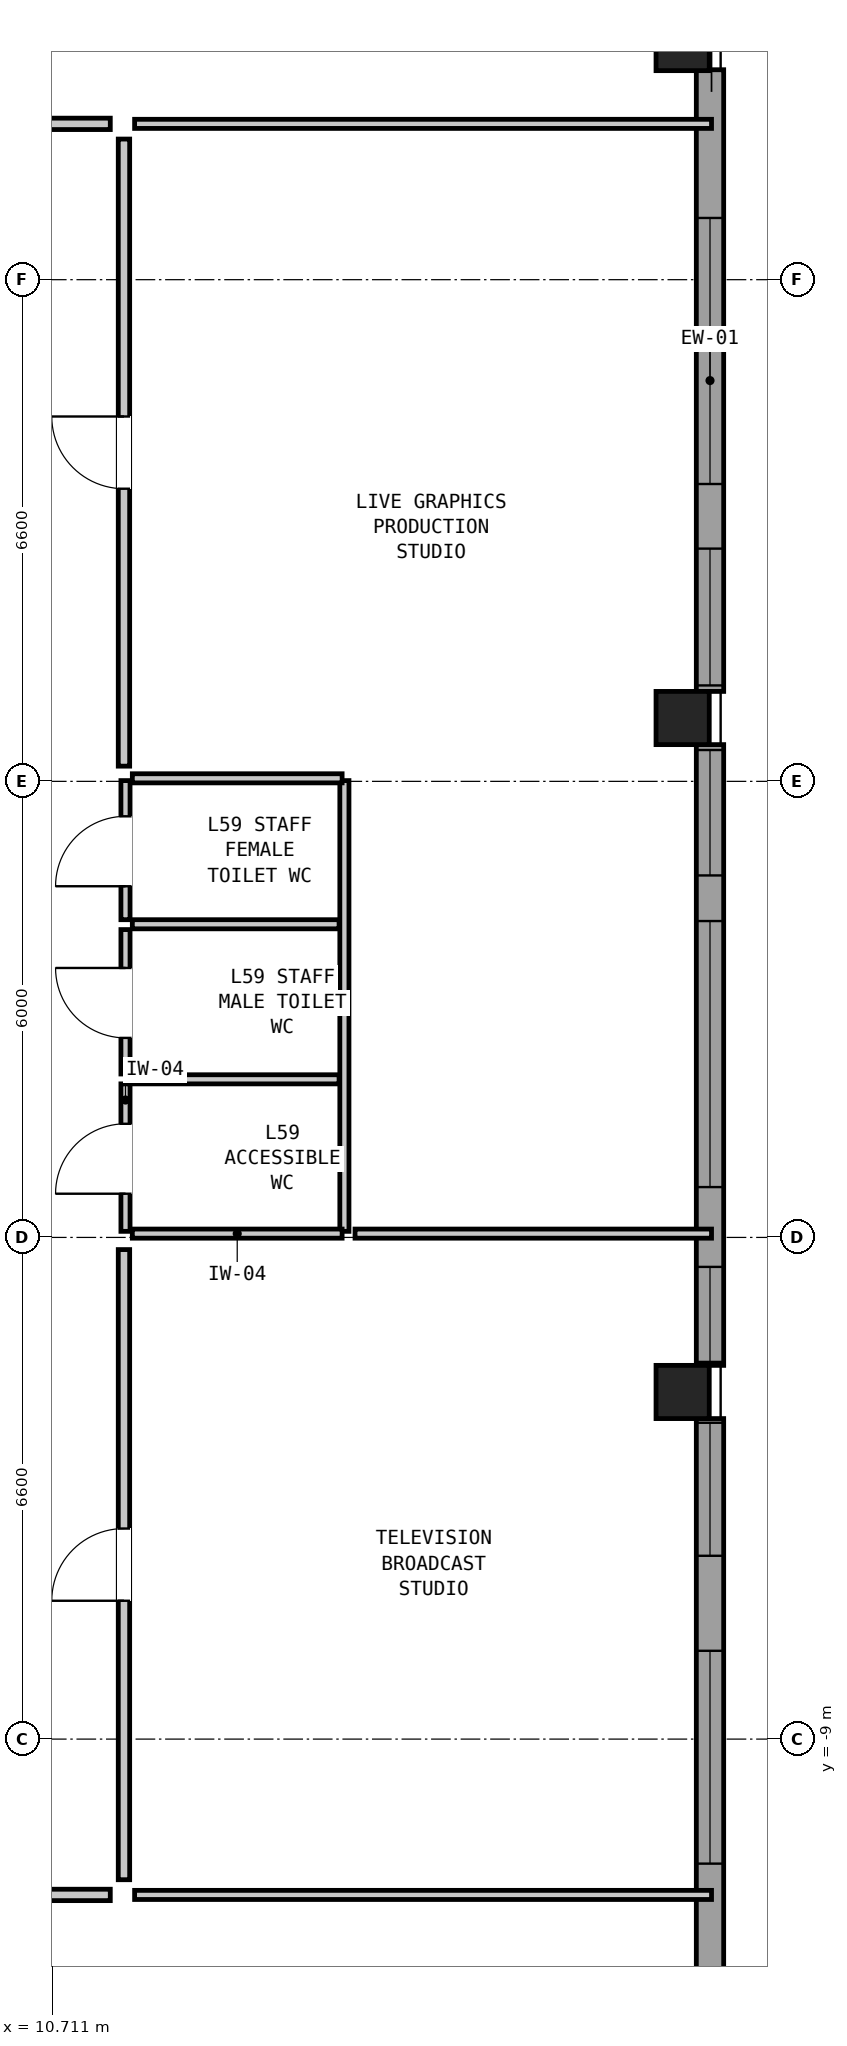
"""IFC4 building model, lengths in metres.
Left out: names, types, materials, properties, quantities, classifications, styles, units other than length and angle.
Written with IfcOpenShell. Run it as: python <this file> out.ifc"""

import sys

from ifc_helpers import new_model, si_unit, direction, frame, frame_2d, origin, origin_2d, place, context, subcontext, project, spatial, rectangle, hollow_rectangle, extrude, element, fill, save


model = new_model("IFC4")
c1 = context("Model", 3, precision=1e-05, world=origin(), true_north=direction((0.0, 1.0)))
c2 = subcontext(c1, "Body", "Model", "MODEL_VIEW")
j1 = project(units=[si_unit("LENGTHUNIT", "METRE"), si_unit("PLANEANGLEUNIT", "RADIAN")], contexts=[c1])
p1 = place(None, origin())
s1 = spatial("IfcSite", under=j1, at=p1, CompositionType="ELEMENT")
p2 = place(p1, origin())
s2 = spatial("IfcBuilding", under=s1, at=p2, CompositionType="ELEMENT")
p3 = place(p2, frame((0.0, 0.0, 202.55)))
s3 = spatial("IfcBuildingStorey", under=s2, at=p3, CompositionType="ELEMENT", Elevation=202.55)
for number, where, z_axis, x_axis in (
    (1, (19.0, -4.433, 0.0), (0.0, 0.0, 1.0), (0.0, 1.0, 0.0)),
    (2, (19.0, 4.433, 0.0), (0.0, 0.0, 1.0), (0.0, 1.0, 0.0)),
    (3, (19.0, 13.3, 0.0), (0.0, 0.0, 1.0), (0.0, 1.0, 0.0)),
):
    element("IfcColumn", number, at=place(p3, frame(where, z_axis=z_axis, x_axis=x_axis)), inside=s3, PredefinedType="COLUMN", context=c2, shape_type="SweptSolid", body=[
        extrude(hollow_rectangle(XDim=0.7, YDim=0.7, WallThickness=0.045, at=origin_2d()), origin(), (0.0, 0.0, 1.0), 3.05),
    ])
p4 = place(p3, frame((19.36, 12.962, 0.0), z_axis=(0.0, 0.0, 1.0), x_axis=(0.0, -1.0, 0.0)))
e4 = element("IfcWall", 4, at=p4, inside=s3, PredefinedType="SOLIDWALL", context=c2, shape_type="SweptSolid", body=[
    extrude(rectangle(XDim=8.179, YDim=0.36, at=frame_2d((4.089, 0.0))), origin(), (0.0, 0.0, 1.0), 2.374),
])
p5 = place(p4, frame((1.95, 0.0, 0.2)))
e5 = element("IfcOpeningElement", 5, at=p5, cuts=e4, PredefinedType="OPENING", context=c2, shape_type="SweptSolid", body=[
    extrude(rectangle(XDim=3.5, YDim=0.95, at=frame_2d((1.75, 0.475))), frame((0.0, 0.192, 0.0), z_axis=(0.0, -1.0, 0.0), x_axis=(1.0, 0.0, 0.0)), (0.0, 0.0, 1.0), 0.384),
])
p6 = place(p4, frame((6.3, 0.0, 1.15)))
e6 = element("IfcOpeningElement", 6, at=p6, cuts=e4, PredefinedType="OPENING", context=c2, shape_type="SweptSolid", body=[
    extrude(rectangle(XDim=1.8, YDim=1.05, at=frame_2d((0.9, 0.525))), frame((0.0, 0.192, 0.0), z_axis=(0.0, -1.0, 0.0), x_axis=(1.0, 0.0, 0.0)), (0.0, 0.0, 1.0), 0.384),
])
p7 = place(p3, frame((19.36, 4.083, 0.0), z_axis=(0.0, 0.0, 1.0), x_axis=(0.0, -1.0, 0.0)))
e7 = element("IfcWall", 7, at=p7, inside=s3, PredefinedType="SOLIDWALL", context=c2, shape_type="SweptSolid", body=[
    extrude(rectangle(XDim=8.167, YDim=0.36, at=frame_2d((4.083, 0.0))), origin(), (0.0, 0.0, 1.0), 2.374),
])
p8 = place(p7, frame((0.071, 0.0, 1.3)))
e8 = element("IfcOpeningElement", 8, at=p8, cuts=e7, PredefinedType="OPENING", context=c2, shape_type="SweptSolid", body=[
    extrude(rectangle(XDim=1.65, YDim=0.9, at=frame_2d((0.825, 0.45))), frame((0.0, 0.192, 0.0), z_axis=(0.0, -1.0, 0.0), x_axis=(1.0, 0.0, 0.0)), (0.0, 0.0, 1.0), 0.384),
])
p9 = place(p7, frame((2.321, 0.0, 0.2)))
e9 = element("IfcOpeningElement", 9, at=p9, cuts=e7, PredefinedType="OPENING", context=c2, shape_type="SweptSolid", body=[
    extrude(rectangle(XDim=3.5, YDim=0.95, at=frame_2d((1.75, 0.475))), frame((0.0, 0.192, 0.0), z_axis=(0.0, -1.0, 0.0), x_axis=(1.0, 0.0, 0.0)), (0.0, 0.0, 1.0), 0.384),
])
p10 = place(p7, frame((6.871, 0.0, 1.05)))
e10 = element("IfcOpeningElement", 10, at=p10, cuts=e7, PredefinedType="OPENING", context=c2, shape_type="SweptSolid", body=[
    extrude(rectangle(XDim=1.25, YDim=1.15, at=frame_2d((0.625, 0.575))), frame((0.0, 0.192, 0.0), z_axis=(0.0, -1.0, 0.0), x_axis=(1.0, 0.0, 0.0)), (0.0, 0.0, 1.0), 0.384),
])
p11 = place(p3, frame((19.36, -4.783, 0.0), z_axis=(0.0, 0.0, 1.0), x_axis=(0.0, -1.0, 0.0)))
e11 = element("IfcWall", 11, at=p11, inside=s3, PredefinedType="SOLIDWALL", context=c2, shape_type="SweptSolid", body=[
    extrude(rectangle(XDim=8.179, YDim=0.36, at=frame_2d((4.089, 0.0))), origin(), (0.0, 0.0, 1.0), 2.374),
])
p12 = place(p11, frame((0.055, 0.0, 1.1)))
e12 = element("IfcOpeningElement", 12, at=p12, cuts=e11, PredefinedType="OPENING", context=c2, shape_type="SweptSolid", body=[
    extrude(rectangle(XDim=1.75, YDim=1.1, at=frame_2d((0.875, 0.55))), frame((0.0, 0.192, 0.0), z_axis=(0.0, -1.0, 0.0), x_axis=(1.0, 0.0, 0.0)), (0.0, 0.0, 1.0), 0.384),
])
p13 = place(p11, frame((3.055, 0.0, 0.2)))
e13 = element("IfcOpeningElement", 13, at=p13, cuts=e11, PredefinedType="OPENING", context=c2, shape_type="SweptSolid", body=[
    extrude(rectangle(XDim=2.8, YDim=1.15, at=frame_2d((1.4, 0.575))), frame((0.0, 0.192, 0.0), z_axis=(0.0, -1.0, 0.0), x_axis=(1.0, 0.0, 0.0)), (0.0, 0.0, 1.0), 0.384),
])
p14 = place(p3, frame((11.67, -2.32, 0.0), z_axis=(0.0, 0.0, 1.0), x_axis=(0.0, 1.0, 0.0)))
e14 = element("IfcWall", 14, at=p14, inside=s3, PredefinedType="PARTITIONING", context=c2, shape_type="SweptSolid", body=[
    extrude(rectangle(XDim=1.94, YDim=0.12, at=frame_2d((0.97, 0.0))), origin(), (0.0, 0.0, 1.0), 2.86),
])
p15 = place(p14, frame((0.495, 0.0, 0.0)))
e15 = element("IfcOpeningElement", 15, at=p15, cuts=e14, PredefinedType="OPENING", context=c2, shape_type="SweptSolid", body=[
    extrude(rectangle(XDim=0.92, YDim=2.1, at=frame_2d((0.46, 1.05))), frame((0.0, 0.072, 0.0), z_axis=(0.0, -1.0, 0.0), x_axis=(1.0, 0.0, 0.0)), (0.0, 0.0, 1.0), 0.144),
])
p16 = place(p3, frame((11.67, -0.25, 0.0), z_axis=(0.0, 0.0, 1.0), x_axis=(0.0, 1.0, 0.0)))
e16 = element("IfcWall", 16, at=p16, inside=s3, PredefinedType="PARTITIONING", context=c2, shape_type="SweptSolid", body=[
    extrude(rectangle(XDim=1.9, YDim=0.12, at=frame_2d((0.95, 0.0))), origin(), (0.0, 0.0, 1.0), 2.86),
])
p17 = place(p16, frame((0.475, 0.0, 0.0)))
e17 = element("IfcOpeningElement", 17, at=p17, cuts=e16, PredefinedType="OPENING", context=c2, shape_type="SweptSolid", body=[
    extrude(rectangle(XDim=0.92, YDim=2.1, at=frame_2d((0.46, 1.05))), frame((0.0, 0.072, 0.0), z_axis=(0.0, -1.0, 0.0), x_axis=(1.0, 0.0, 0.0)), (0.0, 0.0, 1.0), 0.144),
])
p18 = place(p3, frame((11.67, 1.78, 0.0), z_axis=(0.0, 0.0, 1.0), x_axis=(0.0, 1.0, 0.0)))
e18 = element("IfcWall", 18, at=p18, inside=s3, PredefinedType="PARTITIONING", context=c2, shape_type="SweptSolid", body=[
    extrude(rectangle(XDim=1.83, YDim=0.12, at=frame_2d((0.915, 0.0))), origin(), (0.0, 0.0, 1.0), 2.86),
])
p19 = place(p18, frame((0.44, 0.0, 0.0)))
e19 = element("IfcOpeningElement", 19, at=p19, cuts=e18, PredefinedType="OPENING", context=c2, shape_type="SweptSolid", body=[
    extrude(rectangle(XDim=0.92, YDim=2.1, at=frame_2d((0.46, 1.05))), frame((0.0, 0.072, 0.0), z_axis=(0.0, -1.0, 0.0), x_axis=(1.0, 0.0, 0.0)), (0.0, 0.0, 1.0), 0.144),
])
p20 = place(p3, frame((14.55, -2.32, 0.0), z_axis=(0.0, 0.0, 1.0), x_axis=(0.0, 1.0, 0.0)))
e20 = element("IfcWall", 20, at=p20, inside=s3, PredefinedType="PARTITIONING", context=c2, shape_type="SweptSolid", body=[
    extrude(rectangle(XDim=5.93, YDim=0.12, at=frame_2d((2.965, 0.0))), origin(), (0.0, 0.0, 1.0), 2.86),
])
for number, where, z_axis, x_axis in (
    (21, (11.76, -2.35, 0.0), (0.0, 0.0, 1.0), (1.0, 0.0, 0.0)),
    (22, (11.76, 3.64, 0.0), (0.0, 0.0, 1.0), (1.0, 0.0, 0.0)),
):
    element("IfcWall", number, at=place(p3, frame(where, z_axis=z_axis, x_axis=x_axis)), inside=s3, PredefinedType="PARTITIONING", context=c2, shape_type="SweptSolid", body=[
        extrude(rectangle(XDim=2.76, YDim=0.12, at=frame_2d((1.38, 0.0))), origin(), (0.0, 0.0, 1.0), 1.981),
    ])
for number, where, z_axis, x_axis in (
    (23, (11.76, -0.32, 0.0), (0.0, 0.0, 1.0), (1.0, 0.0, 0.0)),
    (24, (11.76, 1.72, 0.0), (0.0, 0.0, 1.0), (1.0, 0.0, 0.0)),
):
    element("IfcWall", number, at=place(p3, frame(where, z_axis=z_axis, x_axis=x_axis)), inside=s3, PredefinedType="PARTITIONING", context=c2, shape_type="SweptSolid", body=[
        extrude(rectangle(XDim=2.72, YDim=0.12, at=frame_2d((1.36, 0.0))), origin(), (0.0, 0.0, 1.0), 2.86),
    ])
for number, where, z_axis, x_axis in (
    (25, (11.79, 12.25, 0.0), (0.0, 0.0, 1.0), (1.0, 0.0, 0.0)),
    (26, (11.79, -11.05, 0.0), (0.0, 0.0, 1.0), (1.0, 0.0, 0.0)),
):
    element("IfcWall", number, at=place(p3, frame(where, z_axis=z_axis, x_axis=x_axis)), inside=s3, PredefinedType="PARTITIONING", context=c2, shape_type="SweptSolid", body=[
        extrude(rectangle(XDim=7.59, YDim=0.12, at=frame_2d((3.795, 0.0))), origin(), (0.0, 0.0, 1.0), 2.86),
    ])
p21 = place(p3, frame((14.69, -2.35, 0.0), z_axis=(0.0, 0.0, 1.0), x_axis=(1.0, 0.0, 0.0)))
e27 = element("IfcWall", 27, at=p21, inside=s3, PredefinedType="PARTITIONING", context=c2, shape_type="SweptSolid", body=[
    extrude(rectangle(XDim=4.69, YDim=0.12, at=frame_2d((2.345, 0.0))), origin(), (0.0, 0.0, 1.0), 1.981),
])
p22 = place(p3, frame((-0.92, 12.25, 0.0), z_axis=(0.0, 0.0, 1.0), x_axis=(1.0, 0.0, 0.0)))
e28 = element("IfcWall", 28, at=p22, inside=s3, PredefinedType="PARTITIONING", context=c2, shape_type="SweptSolid", body=[
    extrude(rectangle(XDim=12.39, YDim=0.15, at=frame_2d((6.195, 0.0))), origin(), (0.0, 0.0, 1.0), 2.86),
])
p23 = place(p22, frame((5.72, 0.0, 0.0)))
e29 = element("IfcOpeningElement", 29, at=p23, cuts=e28, PredefinedType="OPENING", context=c2, shape_type="SweptSolid", body=[
    extrude(rectangle(XDim=0.95, YDim=2.1, at=frame_2d((0.475, 1.05))), frame((0.0, 0.087, 0.0), z_axis=(0.0, -1.0, 0.0), x_axis=(1.0, 0.0, 0.0)), (0.0, 0.0, 1.0), 0.174),
])
p24 = place(p3, frame((-11.12, -11.05, 0.0), z_axis=(0.0, 0.0, 1.0), x_axis=(1.0, 0.0, 0.0)))
e30 = element("IfcWall", 30, at=p24, inside=s3, PredefinedType="PARTITIONING", context=c2, shape_type="SweptSolid", body=[
    extrude(rectangle(XDim=22.59, YDim=0.15, at=frame_2d((11.295, 0.0))), origin(), (0.0, 0.0, 1.0), 2.86),
])
p25 = place(p24, frame((10.82, 0.0, 0.0)))
e31 = element("IfcOpeningElement", 31, at=p25, cuts=e30, PredefinedType="OPENING", context=c2, shape_type="SweptSolid", body=[
    extrude(rectangle(XDim=0.95, YDim=2.1, at=frame_2d((0.475, 1.05))), frame((0.0, 0.087, 0.0), z_axis=(0.0, -1.0, 0.0), x_axis=(1.0, 0.0, 0.0)), (0.0, 0.0, 1.0), 0.174),
])
p26 = place(p3, frame((11.65, -10.85, 0.0), z_axis=(0.0, 0.0, 1.0), x_axis=(0.0, 1.0, 0.0)))
e32 = element("IfcWall", 32, at=p26, inside=s3, PredefinedType="PARTITIONING", context=c2, shape_type="SweptSolid", body=[
    extrude(rectangle(XDim=8.29, YDim=0.15, at=frame_2d((4.145, 0.0))), origin(), (0.0, 0.0, 1.0), 2.86),
])
p27 = place(p26, frame((3.67, 0.0, 0.0)))
e33 = element("IfcOpeningElement", 33, at=p27, cuts=e32, PredefinedType="OPENING", context=c2, shape_type="SweptSolid", body=[
    extrude(rectangle(XDim=0.95, YDim=2.1, at=frame_2d((0.475, 1.05))), frame((0.0, 0.087, 0.0), z_axis=(0.0, -1.0, 0.0), x_axis=(1.0, 0.0, 0.0)), (0.0, 0.0, 1.0), 0.174),
])
p28 = place(p3, frame((11.65, 3.8, 0.0), z_axis=(0.0, 0.0, 1.0), x_axis=(0.0, 1.0, 0.0)))
e34 = element("IfcWall", 34, at=p28, inside=s3, PredefinedType="PARTITIONING", context=c2, shape_type="SweptSolid", body=[
    extrude(rectangle(XDim=8.25, YDim=0.15, at=frame_2d((4.125, 0.0))), origin(), (0.0, 0.0, 1.0), 2.86),
])
p29 = place(p28, frame((3.65, 0.0, 0.0)))
e35 = element("IfcOpeningElement", 35, at=p29, cuts=e34, PredefinedType="OPENING", context=c2, shape_type="SweptSolid", body=[
    extrude(rectangle(XDim=0.95, YDim=2.1, at=frame_2d((0.475, 1.05))), frame((0.0, 0.087, 0.0), z_axis=(0.0, -1.0, 0.0), x_axis=(1.0, 0.0, 0.0)), (0.0, 0.0, 1.0), 0.174),
])
p30 = place(p5, origin())
e36 = element("IfcWindow", 36, at=p30, inside=s3, PartitioningType="SINGLE_PANEL", PredefinedType="WINDOW", context=c2, shape_type="SweptSolid", body=[
    extrude(rectangle(XDim=3.5, YDim=0.95, at=frame_2d((1.75, 0.475))), frame((0.0, 0.03, 0.0), z_axis=(0.0, -1.0, 0.0), x_axis=(1.0, 0.0, 0.0)), (0.0, 0.0, 1.0), 0.06),
])
fill(e5, e36)
p31 = place(p6, origin())
e37 = element("IfcWindow", 37, at=p31, inside=s3, PartitioningType="SINGLE_PANEL", PredefinedType="WINDOW", context=c2, shape_type="SweptSolid", body=[
    extrude(rectangle(XDim=1.8, YDim=1.05, at=frame_2d((0.9, 0.525))), frame((0.0, 0.03, 0.0), z_axis=(0.0, -1.0, 0.0), x_axis=(1.0, 0.0, 0.0)), (0.0, 0.0, 1.0), 0.06),
])
fill(e6, e37)
p32 = place(p8, origin())
e38 = element("IfcWindow", 38, at=p32, inside=s3, PartitioningType="SINGLE_PANEL", PredefinedType="WINDOW", context=c2, shape_type="SweptSolid", body=[
    extrude(rectangle(XDim=1.65, YDim=0.9, at=frame_2d((0.825, 0.45))), frame((0.0, 0.03, 0.0), z_axis=(0.0, -1.0, 0.0), x_axis=(1.0, 0.0, 0.0)), (0.0, 0.0, 1.0), 0.06),
])
fill(e8, e38)
p33 = place(p9, origin())
e39 = element("IfcWindow", 39, at=p33, inside=s3, PartitioningType="SINGLE_PANEL", PredefinedType="WINDOW", context=c2, shape_type="SweptSolid", body=[
    extrude(rectangle(XDim=3.5, YDim=0.95, at=frame_2d((1.75, 0.475))), frame((0.0, 0.03, 0.0), z_axis=(0.0, -1.0, 0.0), x_axis=(1.0, 0.0, 0.0)), (0.0, 0.0, 1.0), 0.06),
])
fill(e9, e39)
p34 = place(p10, origin())
e40 = element("IfcWindow", 40, at=p34, inside=s3, PartitioningType="SINGLE_PANEL", PredefinedType="WINDOW", context=c2, shape_type="SweptSolid", body=[
    extrude(rectangle(XDim=1.25, YDim=1.15, at=frame_2d((0.625, 0.575))), frame((0.0, 0.03, 0.0), z_axis=(0.0, -1.0, 0.0), x_axis=(1.0, 0.0, 0.0)), (0.0, 0.0, 1.0), 0.06),
])
fill(e10, e40)
p35 = place(p12, origin())
e41 = element("IfcWindow", 41, at=p35, inside=s3, PartitioningType="SINGLE_PANEL", PredefinedType="WINDOW", context=c2, shape_type="SweptSolid", body=[
    extrude(rectangle(XDim=1.75, YDim=1.1, at=frame_2d((0.875, 0.55))), frame((0.0, 0.03, 0.0), z_axis=(0.0, -1.0, 0.0), x_axis=(1.0, 0.0, 0.0)), (0.0, 0.0, 1.0), 0.06),
])
fill(e12, e41)
p36 = place(p13, origin())
e42 = element("IfcWindow", 42, at=p36, inside=s3, PartitioningType="SINGLE_PANEL", PredefinedType="WINDOW", context=c2, shape_type="SweptSolid", body=[
    extrude(rectangle(XDim=2.8, YDim=1.15, at=frame_2d((1.4, 0.575))), frame((0.0, 0.03, 0.0), z_axis=(0.0, -1.0, 0.0), x_axis=(1.0, 0.0, 0.0)), (0.0, 0.0, 1.0), 0.06),
])
fill(e13, e42)
p37 = place(p15, origin())
e43 = element("IfcDoor", 43, at=p37, inside=s3, OperationType="SINGLE_SWING_LEFT", PredefinedType="DOOR", context=c2, shape_type="SweptSolid", body=[
    extrude(rectangle(XDim=0.92, YDim=2.1, at=frame_2d((0.46, 1.05))), frame((0.0, 0.025, 0.0), z_axis=(0.0, -1.0, 0.0), x_axis=(1.0, 0.0, 0.0)), (0.0, 0.0, 1.0), 0.05),
])
fill(e15, e43)
p38 = place(p17, origin())
e44 = element("IfcDoor", 44, at=p38, inside=s3, OperationType="SINGLE_SWING_RIGHT", PredefinedType="DOOR", context=c2, shape_type="SweptSolid", body=[
    extrude(rectangle(XDim=0.92, YDim=2.1, at=frame_2d((0.46, 1.05))), frame((0.0, 0.025, 0.0), z_axis=(0.0, -1.0, 0.0), x_axis=(1.0, 0.0, 0.0)), (0.0, 0.0, 1.0), 0.05),
])
fill(e17, e44)
p39 = place(p19, origin())
e45 = element("IfcDoor", 45, at=p39, inside=s3, OperationType="SINGLE_SWING_LEFT", PredefinedType="DOOR", context=c2, shape_type="SweptSolid", body=[
    extrude(rectangle(XDim=0.92, YDim=2.1, at=frame_2d((0.46, 1.05))), frame((0.0, 0.025, 0.0), z_axis=(0.0, -1.0, 0.0), x_axis=(1.0, 0.0, 0.0)), (0.0, 0.0, 1.0), 0.05),
])
fill(e19, e45)
p40 = place(p27, origin())
e46 = element("IfcDoor", 46, at=p40, inside=s3, OperationType="SINGLE_SWING_LEFT", PredefinedType="DOOR", context=c2, shape_type="SweptSolid", body=[
    extrude(rectangle(XDim=0.95, YDim=2.1, at=frame_2d((0.475, 1.05))), frame((0.0, 0.025, 0.0), z_axis=(0.0, -1.0, 0.0), x_axis=(1.0, 0.0, 0.0)), (0.0, 0.0, 1.0), 0.05),
])
fill(e33, e46)
p41 = place(p29, origin())
e47 = element("IfcDoor", 47, at=p41, inside=s3, OperationType="SINGLE_SWING_RIGHT", PredefinedType="DOOR", context=c2, shape_type="SweptSolid", body=[
    extrude(rectangle(XDim=0.95, YDim=2.1, at=frame_2d((0.475, 1.05))), frame((0.0, 0.025, 0.0), z_axis=(0.0, -1.0, 0.0), x_axis=(1.0, 0.0, 0.0)), (0.0, 0.0, 1.0), 0.05),
])
fill(e35, e47)
save(model, sys.argv[1])
